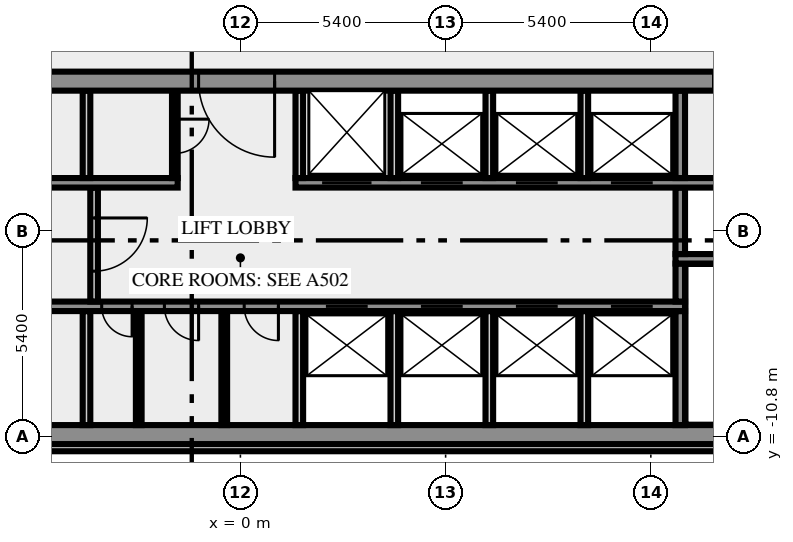
"""IFC4 building model, lengths in metres.
Left out: names, types, materials, properties, quantities, classifications, styles, units other than length and angle.
Written with IfcOpenShell. Run it as: python <this file> out.ifc"""

import sys

from ifc_helpers import new_model, si_unit, direction, frame, frame_2d, origin, place, context, subcontext, project, spatial, rectangle, extrude, element, fill, save


model = new_model("IFC4")
c1 = context("Model", 3, precision=1e-05, world=origin(), true_north=direction((0.0, 1.0)))
c2 = subcontext(c1, "Body", "Model", "MODEL_VIEW")
j1 = project(units=[si_unit("LENGTHUNIT", "METRE"), si_unit("PLANEANGLEUNIT", "RADIAN")], contexts=[c1])
p1 = place(None, origin())
s1 = spatial("IfcSite", under=j1, at=p1, CompositionType="ELEMENT")
p2 = place(p1, origin())
s2 = spatial("IfcBuilding", under=s1, at=p2, CompositionType="ELEMENT")
p3 = place(p2, frame((0.0, 0.0, 238.0)))
s3 = spatial("IfcBuildingStorey", under=s2, at=p3, CompositionType="ELEMENT", Elevation=238.0)
p4 = place(p3, frame((-17.444, -11.088, 0.0), z_axis=(0.0, 0.0, 1.0), x_axis=(1.0, 0.0, 0.0)))
e1 = element("IfcWall", 1, at=p4, inside=s3, PredefinedType="SOLIDWALL", context=c2, shape_type="SweptSolid", body=[
    extrude(rectangle(XDim=34.888, YDim=0.2, at=frame_2d((17.444, 0.0))), origin(), (0.0, 0.0, 1.0), 3.4),
])
p5 = place(p3, frame((-20.0, -10.75, 0.0), z_axis=(0.0, 0.0, 1.0), x_axis=(1.0, 0.0, 0.0)))
e2 = element("IfcWall", 2, at=p5, inside=s3, PredefinedType="SHEAR", context=c2, shape_type="SweptSolid", body=[
    extrude(rectangle(XDim=40.0, YDim=0.5, at=frame_2d((20.0, 0.0))), origin(), (0.0, 0.0, 1.0), 3.4),
])
p6 = place(p5, frame((0.8, 0.0, 1.0)))
e3 = element("IfcOpeningElement", 3, at=p6, cuts=e2, PredefinedType="OPENING", context=c2, shape_type="SweptSolid", body=[
    extrude(rectangle(XDim=1.2, YDim=1.2, at=frame_2d((0.6, 0.6))), frame((0.0, 0.26, 0.0), z_axis=(0.0, -1.0, 0.0), x_axis=(1.0, 0.0, 0.0)), (0.0, 0.0, 1.0), 0.52),
])
p7 = place(p5, frame((38.0, 0.0, 1.0)))
e4 = element("IfcOpeningElement", 4, at=p7, cuts=e2, PredefinedType="OPENING", context=c2, shape_type="SweptSolid", body=[
    extrude(rectangle(XDim=1.2, YDim=1.2, at=frame_2d((0.6, 0.6))), frame((0.0, 0.26, 0.0), z_axis=(0.0, -1.0, 0.0), x_axis=(1.0, 0.0, 0.0)), (0.0, 0.0, 1.0), 0.52),
])
p8 = place(p3, frame((-4.05, -10.5, 0.0), z_axis=(0.0, 0.0, 1.0), x_axis=(0.0, 1.0, 0.0)))
e5 = element("IfcWall", 5, at=p8, inside=s3, PredefinedType="SOLIDWALL", context=c2, shape_type="SweptSolid", body=[
    extrude(rectangle(XDim=3.0, YDim=0.2, at=frame_2d((1.5, 0.0))), origin(), (0.0, 0.0, 1.0), 3.4),
])
for number, where, z_axis, x_axis in (
    (6, (-2.675, -10.5, 0.0), (0.0, 0.0, 1.0), (0.0, 1.0, 0.0)),
    (7, (-0.425, -10.5, 0.0), (0.0, 0.0, 1.0), (0.0, 1.0, 0.0)),
):
    element("IfcWall", number, at=place(p3, frame(where, z_axis=z_axis, x_axis=x_axis)), inside=s3, PredefinedType="PARTITIONING", context=c2, shape_type="SweptSolid", body=[
        extrude(rectangle(XDim=3.0, YDim=0.15, at=frame_2d((1.5, 0.0))), origin(), (0.0, 0.0, 1.0), 3.4),
    ])
for number, where, z_axis, x_axis in (
    (8, (1.55, -10.5, 0.0), (0.0, 0.0, 1.0), (0.0, 1.0, 0.0)),
    (9, (4.05, -10.5, 0.0), (0.0, 0.0, 1.0), (0.0, 1.0, 0.0)),
    (10, (6.55, -10.5, 0.0), (0.0, 0.0, 1.0), (0.0, 1.0, 0.0)),
    (11, (9.05, -10.5, 0.0), (0.0, 0.0, 1.0), (0.0, 1.0, 0.0)),
):
    element("IfcWall", number, at=place(p3, frame(where, z_axis=z_axis, x_axis=x_axis)), inside=s3, PredefinedType="SOLIDWALL", context=c2, shape_type="SweptSolid", body=[
        extrude(rectangle(XDim=3.0, YDim=0.2, at=frame_2d((1.5, 0.0))), origin(), (0.0, 0.0, 1.0), 3.4),
    ])
p9 = place(p3, frame((11.575, -10.5, 0.0), z_axis=(0.0, 0.0, 1.0), x_axis=(0.0, 1.0, 0.0)))
e12 = element("IfcWall", 12, at=p9, inside=s3, PredefinedType="SHEAR", context=c2, shape_type="SweptSolid", body=[
    extrude(rectangle(XDim=3.0, YDim=0.25, at=frame_2d((1.5, 0.0))), origin(), (0.0, 0.0, 1.0), 3.4),
])
p10 = place(p3, frame((11.7, -7.375, 0.0), z_axis=(0.0, 0.0, 1.0), x_axis=(-1.0, 0.0, 0.0)))
e13 = element("IfcWall", 13, at=p10, inside=s3, PredefinedType="SHEAR", context=c2, shape_type="SweptSolid", body=[
    extrude(rectangle(XDim=23.4, YDim=0.25, at=frame_2d((11.7, 0.0))), origin(), (0.0, 0.0, 1.0), 3.4),
])
p11 = place(p10, frame((19.05, 0.0, 0.0)))
e14 = element("IfcOpeningElement", 14, at=p11, cuts=e13, PredefinedType="OPENING", context=c2, shape_type="SweptSolid", body=[
    extrude(rectangle(XDim=0.9, YDim=2.1, at=frame_2d((0.45, 1.05))), frame((0.0, 0.135, 0.0), z_axis=(0.0, -1.0, 0.0), x_axis=(1.0, 0.0, 0.0)), (0.0, 0.0, 1.0), 0.27),
])
p12 = place(p10, frame((14.55, 0.0, 0.0)))
e15 = element("IfcOpeningElement", 15, at=p12, cuts=e13, PredefinedType="OPENING", context=c2, shape_type="SweptSolid", body=[
    extrude(rectangle(XDim=0.8, YDim=2.1, at=frame_2d((0.4, 1.05))), frame((0.0, 0.135, 0.0), z_axis=(0.0, -1.0, 0.0), x_axis=(1.0, 0.0, 0.0)), (0.0, 0.0, 1.0), 0.27),
])
p13 = place(p10, frame((12.8, 0.0, 0.0)))
e16 = element("IfcOpeningElement", 16, at=p13, cuts=e13, PredefinedType="OPENING", context=c2, shape_type="SweptSolid", body=[
    extrude(rectangle(XDim=0.9, YDim=2.1, at=frame_2d((0.45, 1.05))), frame((0.0, 0.135, 0.0), z_axis=(0.0, -1.0, 0.0), x_axis=(1.0, 0.0, 0.0)), (0.0, 0.0, 1.0), 0.27),
])
p14 = place(p10, frame((10.7, 0.0, 0.0)))
e17 = element("IfcOpeningElement", 17, at=p14, cuts=e13, PredefinedType="OPENING", context=c2, shape_type="SweptSolid", body=[
    extrude(rectangle(XDim=0.9, YDim=2.1, at=frame_2d((0.45, 1.05))), frame((0.0, 0.135, 0.0), z_axis=(0.0, -1.0, 0.0), x_axis=(1.0, 0.0, 0.0)), (0.0, 0.0, 1.0), 0.27),
])
p15 = place(p10, frame((8.35, 0.0, 0.0)))
e18 = element("IfcOpeningElement", 18, at=p15, cuts=e13, PredefinedType="OPENING", context=c2, shape_type="SweptSolid", body=[
    extrude(rectangle(XDim=1.1, YDim=2.1, at=frame_2d((0.55, 1.05))), frame((0.0, 0.135, 0.0), z_axis=(0.0, -1.0, 0.0), x_axis=(1.0, 0.0, 0.0)), (0.0, 0.0, 1.0), 0.27),
])
p16 = place(p10, frame((5.85, 0.0, 0.0)))
e19 = element("IfcOpeningElement", 19, at=p16, cuts=e13, PredefinedType="OPENING", context=c2, shape_type="SweptSolid", body=[
    extrude(rectangle(XDim=1.1, YDim=2.1, at=frame_2d((0.55, 1.05))), frame((0.0, 0.135, 0.0), z_axis=(0.0, -1.0, 0.0), x_axis=(1.0, 0.0, 0.0)), (0.0, 0.0, 1.0), 0.27),
])
p17 = place(p10, frame((3.35, 0.0, 0.0)))
e20 = element("IfcOpeningElement", 20, at=p17, cuts=e13, PredefinedType="OPENING", context=c2, shape_type="SweptSolid", body=[
    extrude(rectangle(XDim=1.1, YDim=2.1, at=frame_2d((0.55, 1.05))), frame((0.0, 0.135, 0.0), z_axis=(0.0, -1.0, 0.0), x_axis=(1.0, 0.0, 0.0)), (0.0, 0.0, 1.0), 0.27),
])
p18 = place(p10, frame((0.85, 0.0, 0.0)))
e21 = element("IfcOpeningElement", 21, at=p18, cuts=e13, PredefinedType="OPENING", context=c2, shape_type="SweptSolid", body=[
    extrude(rectangle(XDim=1.1, YDim=2.1, at=frame_2d((0.55, 1.05))), frame((0.0, 0.135, 0.0), z_axis=(0.0, -1.0, 0.0), x_axis=(1.0, 0.0, 0.0)), (0.0, 0.0, 1.0), 0.27),
])
p19 = place(p3, frame((-3.85, -4.25, 0.0), z_axis=(0.0, 0.0, 1.0), x_axis=(0.0, -1.0, 0.0)))
e22 = element("IfcWall", 22, at=p19, inside=s3, PredefinedType="SOLIDWALL", context=c2, shape_type="SweptSolid", body=[
    extrude(rectangle(XDim=3.0, YDim=0.2, at=frame_2d((1.5, 0.0))), origin(), (0.0, 0.0, 1.0), 3.4),
])
p20 = place(p19, frame((0.8, 0.0, 0.0)))
e23 = element("IfcOpeningElement", 23, at=p20, cuts=e22, PredefinedType="OPENING", context=c2, shape_type="SweptSolid", body=[
    extrude(rectangle(XDim=1.4, YDim=2.1, at=frame_2d((0.7, 1.05))), frame((0.0, 0.11, 0.0), z_axis=(0.0, -1.0, 0.0), x_axis=(1.0, 0.0, 0.0)), (0.0, 0.0, 1.0), 0.22),
])
p21 = place(p3, frame((11.575, -7.25, 0.0), z_axis=(0.0, 0.0, 1.0), x_axis=(0.0, 1.0, 0.0)))
e24 = element("IfcWall", 24, at=p21, inside=s3, PredefinedType="SHEAR", context=c2, shape_type="SweptSolid", body=[
    extrude(rectangle(XDim=1.0, YDim=0.25, at=frame_2d((0.5, 0.0))), origin(), (0.0, 0.0, 1.0), 3.4),
])
p22 = place(p3, frame((19.5, -6.125, 0.0), z_axis=(0.0, 0.0, 1.0), x_axis=(-1.0, 0.0, 0.0)))
e25 = element("IfcWall", 25, at=p22, inside=s3, PredefinedType="SHEAR", context=c2, shape_type="SweptSolid", body=[
    extrude(rectangle(XDim=8.05, YDim=0.25, at=frame_2d((4.025, 0.0))), origin(), (0.0, 0.0, 1.0), 3.4),
])
p23 = place(p22, frame((0.05, 0.0, 0.0)))
e26 = element("IfcOpeningElement", 26, at=p23, cuts=e25, PredefinedType="OPENING", context=c2, shape_type="SweptSolid", body=[
    extrude(rectangle(XDim=1.8, YDim=2.1, at=frame_2d((0.9, 1.05))), frame((0.0, 0.135, 0.0), z_axis=(0.0, -1.0, 0.0), x_axis=(1.0, 0.0, 0.0)), (0.0, 0.0, 1.0), 0.27),
])
p24 = place(p3, frame((11.575, -6.0, 0.0), z_axis=(0.0, 0.0, 1.0), x_axis=(0.0, 1.0, 0.0)))
e27 = element("IfcWall", 27, at=p24, inside=s3, PredefinedType="SHEAR", context=c2, shape_type="SweptSolid", body=[
    extrude(rectangle(XDim=1.75, YDim=0.25, at=frame_2d((0.875, 0.0))), origin(), (0.0, 0.0, 1.0), 3.4),
])
p25 = place(p3, frame((-14.35, -4.125, 0.0), z_axis=(0.0, 0.0, 1.0), x_axis=(1.0, 0.0, 0.0)))
e28 = element("IfcWall", 28, at=p25, inside=s3, PredefinedType="SHEAR", context=c2, shape_type="SweptSolid", body=[
    extrude(rectangle(XDim=12.7, YDim=0.25, at=frame_2d((6.35, 0.0))), origin(), (0.0, 0.0, 1.0), 3.4),
])
p26 = place(p3, frame((1.45, -4.125, 0.0), z_axis=(0.0, 0.0, 1.0), x_axis=(1.0, 0.0, 0.0)))
e29 = element("IfcWall", 29, at=p26, inside=s3, PredefinedType="SHEAR", context=c2, shape_type="SweptSolid", body=[
    extrude(rectangle(XDim=12.9, YDim=0.25, at=frame_2d((6.45, 0.0))), origin(), (0.0, 0.0, 1.0), 3.4),
])
p27 = place(p26, frame((0.7, 0.0, 0.0)))
e30 = element("IfcOpeningElement", 30, at=p27, cuts=e29, PredefinedType="OPENING", context=c2, shape_type="SweptSolid", body=[
    extrude(rectangle(XDim=1.3, YDim=2.1, at=frame_2d((0.65, 1.05))), frame((0.0, 0.135, 0.0), z_axis=(0.0, -1.0, 0.0), x_axis=(1.0, 0.0, 0.0)), (0.0, 0.0, 1.0), 0.27),
])
p28 = place(p26, frame((3.3, 0.0, 0.0)))
e31 = element("IfcOpeningElement", 31, at=p28, cuts=e29, PredefinedType="OPENING", context=c2, shape_type="SweptSolid", body=[
    extrude(rectangle(XDim=1.1, YDim=2.1, at=frame_2d((0.55, 1.05))), frame((0.0, 0.135, 0.0), z_axis=(0.0, -1.0, 0.0), x_axis=(1.0, 0.0, 0.0)), (0.0, 0.0, 1.0), 0.27),
])
p29 = place(p26, frame((5.8, 0.0, 0.0)))
e32 = element("IfcOpeningElement", 32, at=p29, cuts=e29, PredefinedType="OPENING", context=c2, shape_type="SweptSolid", body=[
    extrude(rectangle(XDim=1.1, YDim=2.1, at=frame_2d((0.55, 1.05))), frame((0.0, 0.135, 0.0), z_axis=(0.0, -1.0, 0.0), x_axis=(1.0, 0.0, 0.0)), (0.0, 0.0, 1.0), 0.27),
])
p30 = place(p26, frame((8.3, 0.0, 0.0)))
e33 = element("IfcOpeningElement", 33, at=p30, cuts=e29, PredefinedType="OPENING", context=c2, shape_type="SweptSolid", body=[
    extrude(rectangle(XDim=1.1, YDim=2.1, at=frame_2d((0.55, 1.05))), frame((0.0, 0.135, 0.0), z_axis=(0.0, -1.0, 0.0), x_axis=(1.0, 0.0, 0.0)), (0.0, 0.0, 1.0), 0.27),
])
p31 = place(p3, frame((-4.05, -4.0, 0.0), z_axis=(0.0, 0.0, 1.0), x_axis=(0.0, 1.0, 0.0)))
e34 = element("IfcWall", 34, at=p31, inside=s3, PredefinedType="SOLIDWALL", context=c2, shape_type="SweptSolid", body=[
    extrude(rectangle(XDim=2.3, YDim=0.2, at=frame_2d((1.15, 0.0))), origin(), (0.0, 0.0, 1.0), 3.4),
])
p32 = place(p3, frame((-1.725, -1.7, 0.0), z_axis=(0.0, 0.0, 1.0), x_axis=(0.0, -1.0, 0.0)))
e35 = element("IfcWall", 35, at=p32, inside=s3, PredefinedType="PARTITIONING", context=c2, shape_type="SweptSolid", body=[
    extrude(rectangle(XDim=2.3, YDim=0.15, at=frame_2d((1.15, 0.0))), origin(), (0.0, 0.0, 1.0), 3.4),
])
p33 = place(p32, frame((0.75, 0.0, 0.0)))
e36 = element("IfcOpeningElement", 36, at=p33, cuts=e35, PredefinedType="OPENING", context=c2, shape_type="SweptSolid", body=[
    extrude(rectangle(XDim=0.9, YDim=2.1, at=frame_2d((0.45, 1.05))), frame((0.0, 0.085, 0.0), z_axis=(0.0, -1.0, 0.0), x_axis=(1.0, 0.0, 0.0)), (0.0, 0.0, 1.0), 0.17),
])
for number, where, z_axis, x_axis in (
    (37, (1.55, -4.0, 0.0), (0.0, 0.0, 1.0), (0.0, 1.0, 0.0)),
    (38, (4.05, -4.0, 0.0), (0.0, 0.0, 1.0), (0.0, 1.0, 0.0)),
    (39, (6.55, -4.0, 0.0), (0.0, 0.0, 1.0), (0.0, 1.0, 0.0)),
    (40, (9.05, -4.0, 0.0), (0.0, 0.0, 1.0), (0.0, 1.0, 0.0)),
):
    element("IfcWall", number, at=place(p3, frame(where, z_axis=z_axis, x_axis=x_axis)), inside=s3, PredefinedType="SOLIDWALL", context=c2, shape_type="SweptSolid", body=[
        extrude(rectangle(XDim=2.3, YDim=0.2, at=frame_2d((1.15, 0.0))), origin(), (0.0, 0.0, 1.0), 3.4),
    ])
p34 = place(p3, frame((11.575, -4.0, 0.0), z_axis=(0.0, 0.0, 1.0), x_axis=(0.0, 1.0, 0.0)))
e41 = element("IfcWall", 41, at=p34, inside=s3, PredefinedType="SHEAR", context=c2, shape_type="SweptSolid", body=[
    extrude(rectangle(XDim=2.3, YDim=0.25, at=frame_2d((1.15, 0.0))), origin(), (0.0, 0.0, 1.0), 3.4),
])
p35 = place(p3, frame((20.49, -1.45, 0.0), z_axis=(0.0, 0.0, 1.0), x_axis=(-1.0, 0.0, 0.0)))
e42 = element("IfcWall", 42, at=p35, inside=s3, PredefinedType="SHEAR", context=c2, shape_type="SweptSolid", body=[
    extrude(rectangle(XDim=40.98, YDim=0.5, at=frame_2d((20.49, 0.0))), origin(), (0.0, 0.0, 1.0), 3.4),
])
p36 = place(p35, frame((38.14, 0.0, 0.0)))
e43 = element("IfcOpeningElement", 43, at=p36, cuts=e42, PredefinedType="OPENING", context=c2, shape_type="SweptSolid", body=[
    extrude(rectangle(XDim=1.8, YDim=2.1, at=frame_2d((0.9, 1.05))), frame((0.0, 0.26, 0.0), z_axis=(0.0, -1.0, 0.0), x_axis=(1.0, 0.0, 0.0)), (0.0, 0.0, 1.0), 0.52),
])
p37 = place(p35, frame((36.728, 0.0, 0.0)))
e44 = element("IfcOpeningElement", 44, at=p37, cuts=e42, PredefinedType="OPENING", context=c2, shape_type="SweptSolid", body=[
    extrude(rectangle(XDim=0.8, YDim=2.1, at=frame_2d((0.4, 1.05))), frame((0.0, 0.26, 0.0), z_axis=(0.0, -1.0, 0.0), x_axis=(1.0, 0.0, 0.0)), (0.0, 0.0, 1.0), 0.52),
])
p38 = place(p35, frame((35.153, 0.0, 0.0)))
e45 = element("IfcOpeningElement", 45, at=p38, cuts=e42, PredefinedType="OPENING", context=c2, shape_type="SweptSolid", body=[
    extrude(rectangle(XDim=0.8, YDim=2.1, at=frame_2d((0.4, 1.05))), frame((0.0, 0.26, 0.0), z_axis=(0.0, -1.0, 0.0), x_axis=(1.0, 0.0, 0.0)), (0.0, 0.0, 1.0), 0.52),
])
p39 = place(p35, frame((32.94, 0.0, 0.0)))
e46 = element("IfcOpeningElement", 46, at=p39, cuts=e42, PredefinedType="OPENING", context=c2, shape_type="SweptSolid", body=[
    extrude(rectangle(XDim=0.9, YDim=2.1, at=frame_2d((0.45, 1.05))), frame((0.0, 0.26, 0.0), z_axis=(0.0, -1.0, 0.0), x_axis=(1.0, 0.0, 0.0)), (0.0, 0.0, 1.0), 0.52),
])
p40 = place(p35, frame((29.603, 0.0, 0.0)))
e47 = element("IfcOpeningElement", 47, at=p40, cuts=e42, PredefinedType="OPENING", context=c2, shape_type="SweptSolid", body=[
    extrude(rectangle(XDim=0.9, YDim=2.1, at=frame_2d((0.45, 1.05))), frame((0.0, 0.26, 0.0), z_axis=(0.0, -1.0, 0.0), x_axis=(1.0, 0.0, 0.0)), (0.0, 0.0, 1.0), 0.52),
])
p41 = place(p35, frame((25.877, 0.0, 0.0)))
e48 = element("IfcOpeningElement", 48, at=p41, cuts=e42, PredefinedType="OPENING", context=c2, shape_type="SweptSolid", body=[
    extrude(rectangle(XDim=0.9, YDim=2.1, at=frame_2d((0.45, 1.05))), frame((0.0, 0.26, 0.0), z_axis=(0.0, -1.0, 0.0), x_axis=(1.0, 0.0, 0.0)), (0.0, 0.0, 1.0), 0.52),
])
p42 = place(p35, frame((19.59, 0.0, 0.0)))
e49 = element("IfcOpeningElement", 49, at=p42, cuts=e42, PredefinedType="OPENING", context=c2, shape_type="SweptSolid", body=[
    extrude(rectangle(XDim=2.0, YDim=2.1, at=frame_2d((1.0, 1.05))), frame((0.0, 0.26, 0.0), z_axis=(0.0, -1.0, 0.0), x_axis=(1.0, 0.0, 0.0)), (0.0, 0.0, 1.0), 0.52),
])
p43 = place(p35, frame((7.14, 0.0, 0.0)))
e50 = element("IfcOpeningElement", 50, at=p43, cuts=e42, PredefinedType="OPENING", context=c2, shape_type="SweptSolid", body=[
    extrude(rectangle(XDim=0.9, YDim=2.1, at=frame_2d((0.45, 1.05))), frame((0.0, 0.26, 0.0), z_axis=(0.0, -1.0, 0.0), x_axis=(1.0, 0.0, 0.0)), (0.0, 0.0, 1.0), 0.52),
])
p44 = place(p35, frame((4.19, 0.0, 0.0)))
e51 = element("IfcOpeningElement", 51, at=p44, cuts=e42, PredefinedType="OPENING", context=c2, shape_type="SweptSolid", body=[
    extrude(rectangle(XDim=0.9, YDim=2.1, at=frame_2d((0.45, 1.05))), frame((0.0, 0.26, 0.0), z_axis=(0.0, -1.0, 0.0), x_axis=(1.0, 0.0, 0.0)), (0.0, 0.0, 1.0), 0.52),
])
p45 = place(p35, frame((1.04, 0.0, 0.0)))
e52 = element("IfcOpeningElement", 52, at=p45, cuts=e42, PredefinedType="OPENING", context=c2, shape_type="SweptSolid", body=[
    extrude(rectangle(XDim=1.8, YDim=2.1, at=frame_2d((0.9, 1.05))), frame((0.0, 0.26, 0.0), z_axis=(0.0, -1.0, 0.0), x_axis=(1.0, 0.0, 0.0)), (0.0, 0.0, 1.0), 0.52),
])
p46 = place(p12, origin())
e53 = element("IfcDoor", 53, at=p46, inside=s3, OperationType="SINGLE_SWING_RIGHT", PredefinedType="DOOR", context=c2, shape_type="SweptSolid", body=[
    extrude(rectangle(XDim=0.8, YDim=2.1, at=frame_2d((0.4, 1.05))), frame((0.0, 0.025, 0.0), z_axis=(0.0, -1.0, 0.0), x_axis=(1.0, 0.0, 0.0)), (0.0, 0.0, 1.0), 0.05),
])
fill(e15, e53)
p47 = place(p13, origin())
e54 = element("IfcDoor", 54, at=p47, inside=s3, OperationType="SINGLE_SWING_RIGHT", PredefinedType="DOOR", context=c2, shape_type="SweptSolid", body=[
    extrude(rectangle(XDim=0.9, YDim=2.1, at=frame_2d((0.45, 1.05))), frame((0.0, 0.025, 0.0), z_axis=(0.0, -1.0, 0.0), x_axis=(1.0, 0.0, 0.0)), (0.0, 0.0, 1.0), 0.05),
])
fill(e16, e54)
p48 = place(p14, origin())
e55 = element("IfcDoor", 55, at=p48, inside=s3, OperationType="SINGLE_SWING_LEFT", PredefinedType="DOOR", context=c2, shape_type="SweptSolid", body=[
    extrude(rectangle(XDim=0.9, YDim=2.1, at=frame_2d((0.45, 1.05))), frame((0.0, 0.025, 0.0), z_axis=(0.0, -1.0, 0.0), x_axis=(1.0, 0.0, 0.0)), (0.0, 0.0, 1.0), 0.05),
])
fill(e17, e55)
p49 = place(p15, origin())
e56 = element("IfcDoor", 56, at=p49, inside=s3, OperationType="DOUBLE_DOOR_SLIDING", PredefinedType="DOOR", context=c2, shape_type="SweptSolid", body=[
    extrude(rectangle(XDim=1.1, YDim=2.1, at=frame_2d((0.55, 1.05))), frame((0.0, 0.025, 0.0), z_axis=(0.0, -1.0, 0.0), x_axis=(1.0, 0.0, 0.0)), (0.0, 0.0, 1.0), 0.05),
])
fill(e18, e56)
p50 = place(p16, origin())
e57 = element("IfcDoor", 57, at=p50, inside=s3, OperationType="DOUBLE_DOOR_SLIDING", PredefinedType="DOOR", context=c2, shape_type="SweptSolid", body=[
    extrude(rectangle(XDim=1.1, YDim=2.1, at=frame_2d((0.55, 1.05))), frame((0.0, 0.025, 0.0), z_axis=(0.0, -1.0, 0.0), x_axis=(1.0, 0.0, 0.0)), (0.0, 0.0, 1.0), 0.05),
])
fill(e19, e57)
p51 = place(p17, origin())
e58 = element("IfcDoor", 58, at=p51, inside=s3, OperationType="DOUBLE_DOOR_SLIDING", PredefinedType="DOOR", context=c2, shape_type="SweptSolid", body=[
    extrude(rectangle(XDim=1.1, YDim=2.1, at=frame_2d((0.55, 1.05))), frame((0.0, 0.025, 0.0), z_axis=(0.0, -1.0, 0.0), x_axis=(1.0, 0.0, 0.0)), (0.0, 0.0, 1.0), 0.05),
])
fill(e20, e58)
p52 = place(p18, origin())
e59 = element("IfcDoor", 59, at=p52, inside=s3, OperationType="DOUBLE_DOOR_SLIDING", PredefinedType="DOOR", context=c2, shape_type="SweptSolid", body=[
    extrude(rectangle(XDim=1.1, YDim=2.1, at=frame_2d((0.55, 1.05))), frame((0.0, 0.025, 0.0), z_axis=(0.0, -1.0, 0.0), x_axis=(1.0, 0.0, 0.0)), (0.0, 0.0, 1.0), 0.05),
])
fill(e21, e59)
p53 = place(p20, origin())
e60 = element("IfcDoor", 60, at=p53, inside=s3, OperationType="DOUBLE_DOOR_SINGLE_SWING", PredefinedType="DOOR", context=c2, shape_type="SweptSolid", body=[
    extrude(rectangle(XDim=1.4, YDim=2.1, at=frame_2d((0.7, 1.05))), frame((0.0, 0.025, 0.0), z_axis=(0.0, -1.0, 0.0), x_axis=(1.0, 0.0, 0.0)), (0.0, 0.0, 1.0), 0.05),
])
fill(e23, e60)
p54 = place(p27, origin())
e61 = element("IfcDoor", 61, at=p54, inside=s3, OperationType="DOUBLE_DOOR_SLIDING", PredefinedType="DOOR", context=c2, shape_type="SweptSolid", body=[
    extrude(rectangle(XDim=1.3, YDim=2.1, at=frame_2d((0.65, 1.05))), frame((0.0, 0.025, 0.0), z_axis=(0.0, -1.0, 0.0), x_axis=(1.0, 0.0, 0.0)), (0.0, 0.0, 1.0), 0.05),
])
fill(e30, e61)
p55 = place(p28, origin())
e62 = element("IfcDoor", 62, at=p55, inside=s3, OperationType="DOUBLE_DOOR_SLIDING", PredefinedType="DOOR", context=c2, shape_type="SweptSolid", body=[
    extrude(rectangle(XDim=1.1, YDim=2.1, at=frame_2d((0.55, 1.05))), frame((0.0, 0.025, 0.0), z_axis=(0.0, -1.0, 0.0), x_axis=(1.0, 0.0, 0.0)), (0.0, 0.0, 1.0), 0.05),
])
fill(e31, e62)
p56 = place(p29, origin())
e63 = element("IfcDoor", 63, at=p56, inside=s3, OperationType="DOUBLE_DOOR_SLIDING", PredefinedType="DOOR", context=c2, shape_type="SweptSolid", body=[
    extrude(rectangle(XDim=1.1, YDim=2.1, at=frame_2d((0.55, 1.05))), frame((0.0, 0.025, 0.0), z_axis=(0.0, -1.0, 0.0), x_axis=(1.0, 0.0, 0.0)), (0.0, 0.0, 1.0), 0.05),
])
fill(e32, e63)
p57 = place(p30, origin())
e64 = element("IfcDoor", 64, at=p57, inside=s3, OperationType="DOUBLE_DOOR_SLIDING", PredefinedType="DOOR", context=c2, shape_type="SweptSolid", body=[
    extrude(rectangle(XDim=1.1, YDim=2.1, at=frame_2d((0.55, 1.05))), frame((0.0, 0.025, 0.0), z_axis=(0.0, -1.0, 0.0), x_axis=(1.0, 0.0, 0.0)), (0.0, 0.0, 1.0), 0.05),
])
fill(e33, e64)
p58 = place(p33, origin())
e65 = element("IfcDoor", 65, at=p58, inside=s3, OperationType="SINGLE_SWING_RIGHT", PredefinedType="DOOR", context=c2, shape_type="SweptSolid", body=[
    extrude(rectangle(XDim=0.9, YDim=2.1, at=frame_2d((0.45, 1.05))), frame((0.0, 0.025, 0.0), z_axis=(0.0, -1.0, 0.0), x_axis=(1.0, 0.0, 0.0)), (0.0, 0.0, 1.0), 0.05),
])
fill(e36, e65)
p59 = place(p42, origin())
e66 = element("IfcDoor", 66, at=p59, inside=s3, OperationType="DOUBLE_DOOR_SINGLE_SWING", PredefinedType="DOOR", context=c2, shape_type="SweptSolid", body=[
    extrude(rectangle(XDim=2.0, YDim=2.1, at=frame_2d((1.0, 1.05))), frame((0.0, 0.025, 0.0), z_axis=(0.0, -1.0, 0.0), x_axis=(1.0, 0.0, 0.0)), (0.0, 0.0, 1.0), 0.05),
])
fill(e49, e66)
save(model, sys.argv[1])
